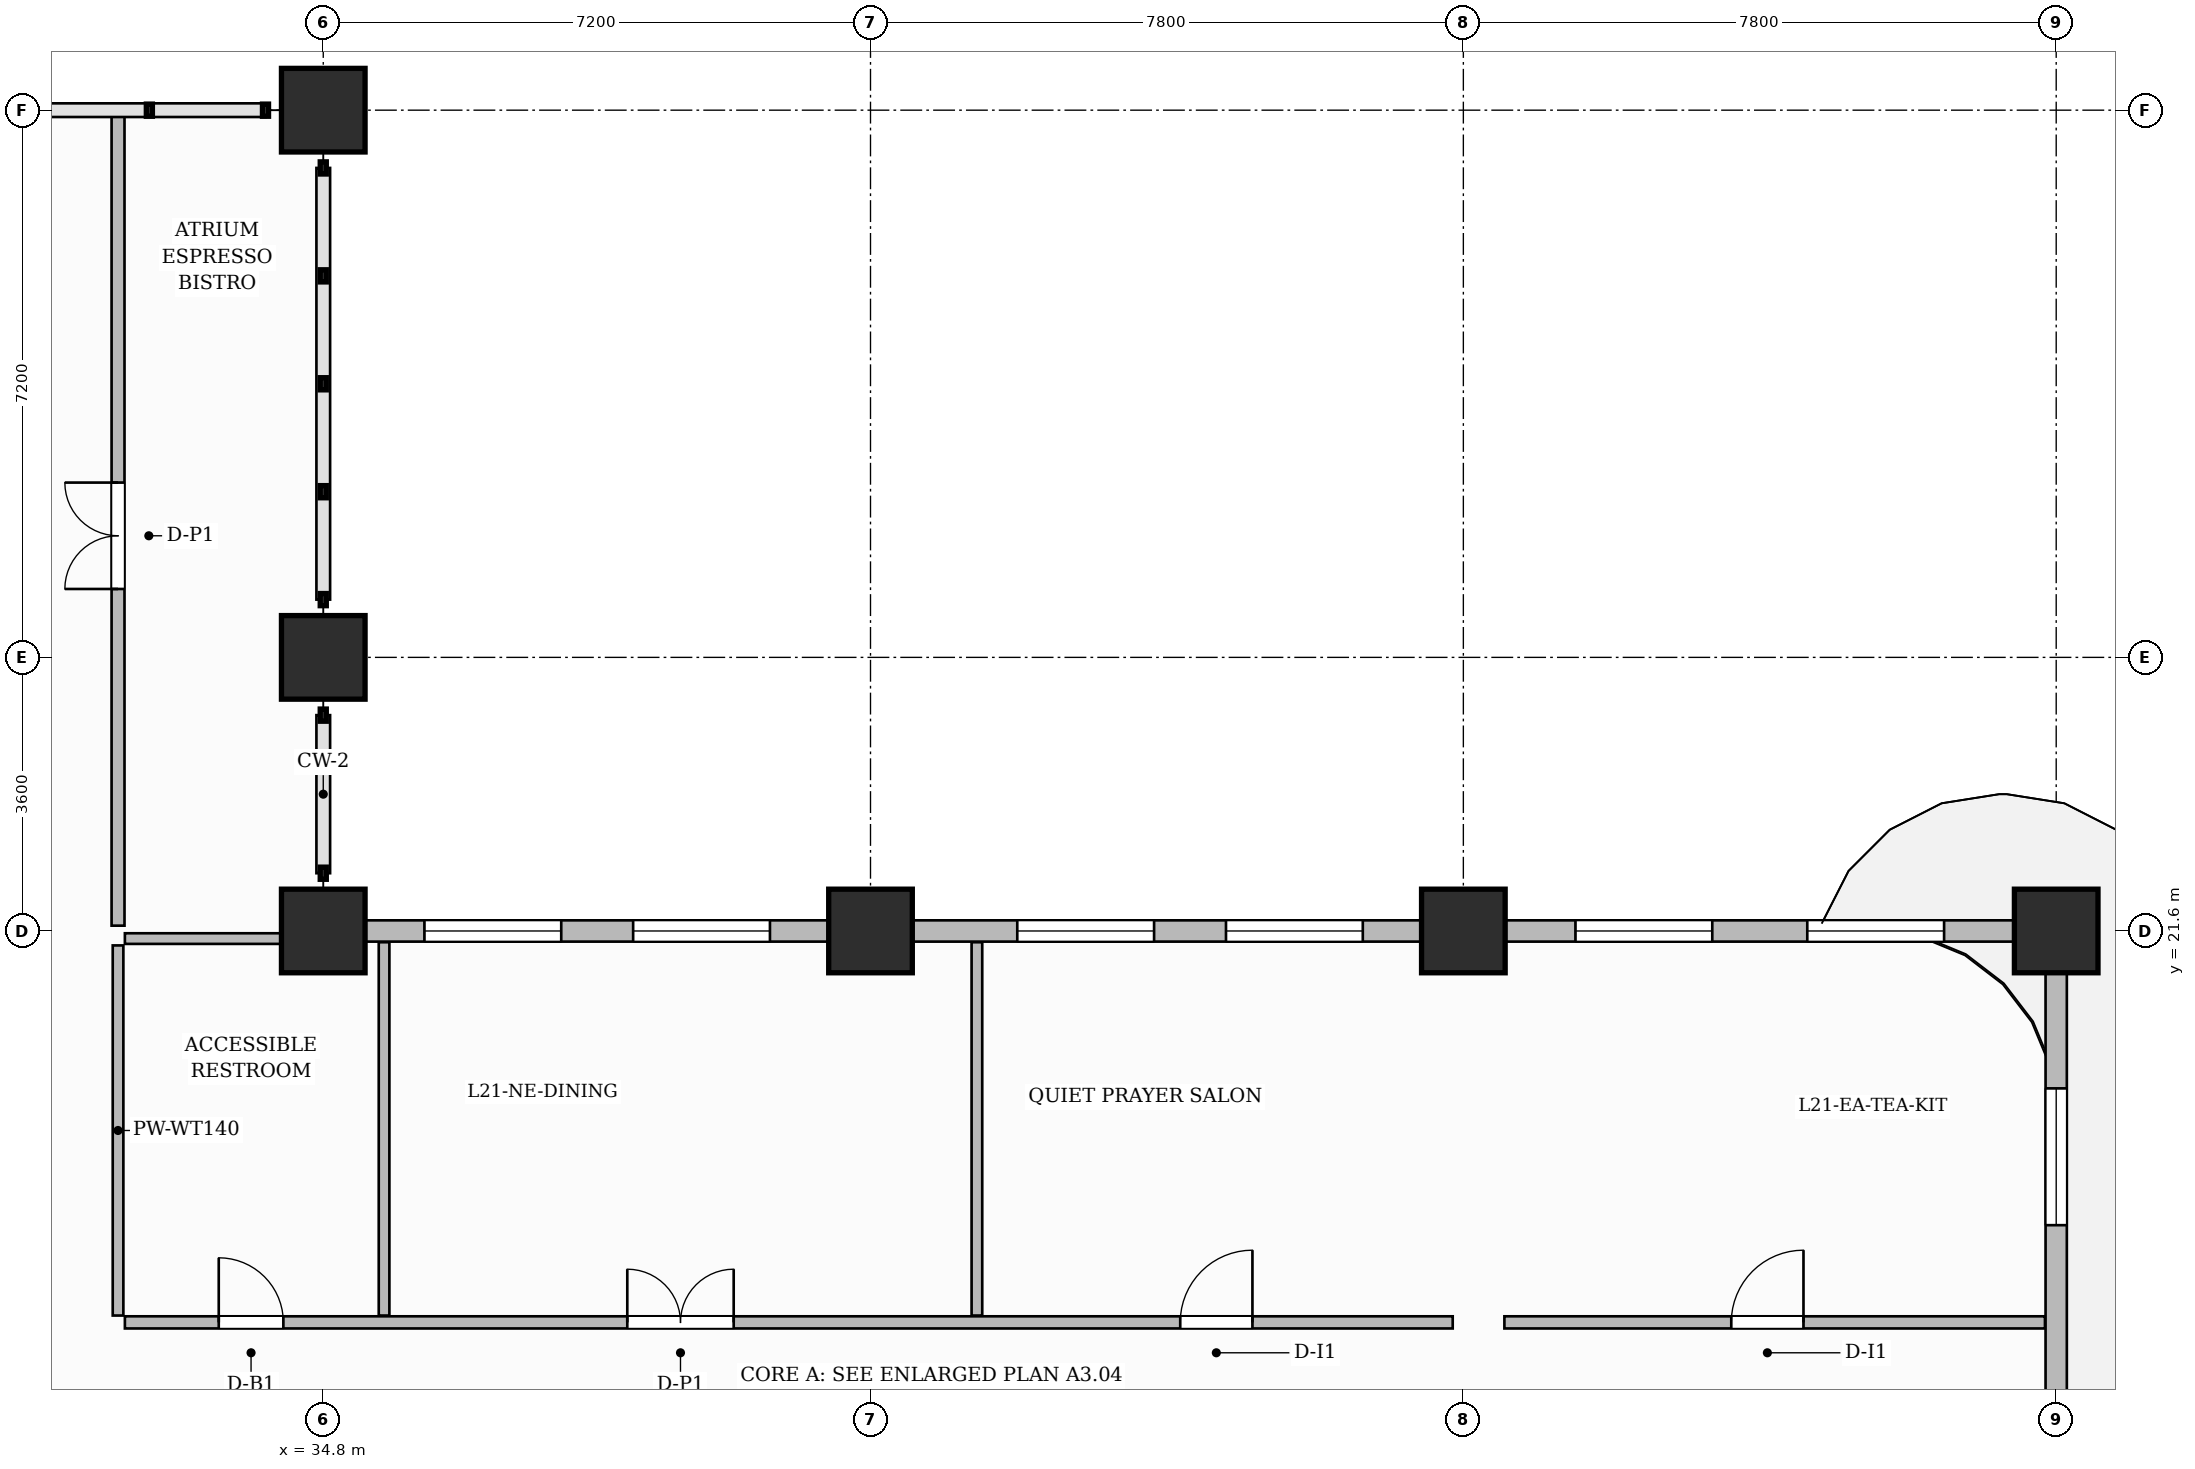
"""IFC4 building model, lengths in metres.
Left out: names, types, materials, properties, quantities, classifications, styles, units other than length and angle.
Written with IfcOpenShell. Run it as: python <this file> out.ifc"""

import sys

from ifc_helpers import new_model, si_unit, direction, frame, frame_2d, origin, origin_2d, place, context, subcontext, project, spatial, rectangle, extrude, source, transform, mapped, element, fill, save


model = new_model("IFC4")
c1 = context("Model", 3, precision=1e-05, world=origin(), true_north=direction((0.0, 1.0)))
c2 = subcontext(c1, "Body", "Model", "MODEL_VIEW")
j1 = project(units=[si_unit("LENGTHUNIT", "METRE"), si_unit("PLANEANGLEUNIT", "RADIAN")], contexts=[c1])
p1 = place(None, origin())
s1 = spatial("IfcSite", under=j1, at=p1, CompositionType="ELEMENT")
p2 = place(p1, origin())
s2 = spatial("IfcBuilding", under=s1, at=p2, CompositionType="ELEMENT")
p3 = place(p2, frame((0.0, 0.0, 87.9)))
s3 = spatial("IfcBuildingStorey", under=s2, at=p3, CompositionType="ELEMENT", Elevation=87.9)
m1 = source(origin(), c2, "Body", "SweptSolid", [
    extrude(rectangle(XDim=1.1, YDim=1.1, at=origin_2d()), origin(), (0.0, 0.0, 1.0), 3.7),
])
for number, where, z_axis, x_axis in (
    (1, (34.8, 21.6, 0.0), (0.0, 0.0, 1.0), (1.0, 0.0, 0.0)),
    (2, (34.8, 25.2, 0.0), (0.0, 0.0, 1.0), (1.0, 0.0, 0.0)),
    (3, (34.8, 32.4, 0.0), (0.0, 0.0, 1.0), (1.0, 0.0, 0.0)),
    (4, (42.0, 21.6, 0.0), (0.0, 0.0, 1.0), (1.0, 0.0, 0.0)),
    (5, (49.8, 21.6, 0.0), (0.0, 0.0, 1.0), (1.0, 0.0, 0.0)),
    (6, (57.6, 21.6, 0.0), (0.0, 0.0, 1.0), (1.0, 0.0, 0.0)),
):
    element("IfcColumn", number, at=place(p3, frame(where, z_axis=z_axis, x_axis=x_axis)), inside=s3, PredefinedType="COLUMN", context=c2, shape_type="MappedRepresentation", body=[
        mapped(m1, transform((0.0, 0.0, 0.0), scale=1.0)),
    ])
p4 = place(p3, frame((32.19, 16.45, 0.0), z_axis=(0.0, 0.0, 1.0), x_axis=(1.0, 0.0, 0.0)))
e7 = element("IfcWall", 7, at=p4, inside=s3, PredefinedType="PARTITIONING", context=c2, shape_type="SweptSolid", body=[
    extrude(rectangle(XDim=17.47, YDim=0.16, at=frame_2d((8.735, 0.0))), origin(), (0.0, 0.0, 1.0), 3.45),
])
p5 = place(p4, frame((1.235, 0.0, 0.0)))
e8 = element("IfcOpeningElement", 8, at=p5, cuts=e7, PredefinedType="OPENING", context=c2, shape_type="SweptSolid", body=[
    extrude(rectangle(XDim=0.85, YDim=2.1, at=frame_2d((0.425, 1.05))), frame((0.0, 0.09, 0.0), z_axis=(0.0, -1.0, 0.0), x_axis=(1.0, 0.0, 0.0)), (0.0, 0.0, 1.0), 0.18),
])
p6 = place(p4, frame((6.61, 0.0, 0.0)))
e9 = element("IfcOpeningElement", 9, at=p6, cuts=e7, PredefinedType="OPENING", context=c2, shape_type="SweptSolid", body=[
    extrude(rectangle(XDim=1.4, YDim=2.35, at=frame_2d((0.7, 1.175))), frame((0.0, 0.09, 0.0), z_axis=(0.0, -1.0, 0.0), x_axis=(1.0, 0.0, 0.0)), (0.0, 0.0, 1.0), 0.18),
])
p7 = place(p4, frame((13.885, 0.0, 0.0)))
e10 = element("IfcOpeningElement", 10, at=p7, cuts=e7, PredefinedType="OPENING", context=c2, shape_type="SweptSolid", body=[
    extrude(rectangle(XDim=0.95, YDim=2.15, at=frame_2d((0.475, 1.075))), frame((0.0, 0.09, 0.0), z_axis=(0.0, -1.0, 0.0), x_axis=(1.0, 0.0, 0.0)), (0.0, 0.0, 1.0), 0.18),
])
p8 = place(p3, frame((50.34, 16.45, 0.0), z_axis=(0.0, 0.0, 1.0), x_axis=(1.0, 0.0, 0.0)))
e11 = element("IfcWall", 11, at=p8, inside=s3, PredefinedType="PARTITIONING", context=c2, shape_type="SweptSolid", body=[
    extrude(rectangle(XDim=7.112, YDim=0.16, at=frame_2d((3.556, 0.0))), origin(), (0.0, 0.0, 1.0), 3.45),
])
p9 = place(p8, frame((2.985, 0.0, 0.0)))
e12 = element("IfcOpeningElement", 12, at=p9, cuts=e11, PredefinedType="OPENING", context=c2, shape_type="SweptSolid", body=[
    extrude(rectangle(XDim=0.95, YDim=2.15, at=frame_2d((0.475, 1.075))), frame((0.0, 0.09, 0.0), z_axis=(0.0, -1.0, 0.0), x_axis=(1.0, 0.0, 0.0)), (0.0, 0.0, 1.0), 0.18),
])
p10 = place(p3, frame((32.1, 16.54, 0.0), z_axis=(0.0, 0.0, 1.0), x_axis=(0.0, 1.0, 0.0)))
e13 = element("IfcWall", 13, at=p10, inside=s3, PredefinedType="PARTITIONING", context=c2, shape_type="SweptSolid", body=[
    extrude(rectangle(XDim=4.87, YDim=0.14, at=frame_2d((2.435, 0.0))), origin(), (0.0, 0.0, 1.0), 3.45),
])
for number, where, z_axis, x_axis in (
    (14, (35.6, 16.54, 0.0), (0.0, 0.0, 1.0), (0.0, 1.0, 0.0)),
    (15, (43.4, 16.54, 0.0), (0.0, 0.0, 1.0), (0.0, 1.0, 0.0)),
):
    element("IfcWall", number, at=place(p3, frame(where, z_axis=z_axis, x_axis=x_axis)), inside=s3, PredefinedType="PARTITIONING", context=c2, shape_type="SweptSolid", body=[
        extrude(rectangle(XDim=4.912, YDim=0.14, at=frame_2d((2.456, 0.0))), origin(), (0.0, 0.0, 1.0), 3.45),
    ])
p11 = place(p3, frame((32.19, 21.5, 0.0), z_axis=(0.0, 0.0, 1.0), x_axis=(1.0, 0.0, 0.0)))
e16 = element("IfcWall", 16, at=p11, inside=s3, PredefinedType="PARTITIONING", context=c2, shape_type="SweptSolid", body=[
    extrude(rectangle(XDim=2.42, YDim=0.14, at=frame_2d((1.21, 0.0))), origin(), (0.0, 0.0, 1.0), 2.885),
])
p12 = place(p3, frame((32.1, 21.67, 0.0), z_axis=(0.0, 0.0, 1.0), x_axis=(0.0, 1.0, 0.0)))
e17 = element("IfcWall", 17, at=p12, inside=s3, PredefinedType="PARTITIONING", context=c2, shape_type="SweptSolid", body=[
    extrude(rectangle(XDim=10.702, YDim=0.17, at=frame_2d((5.351, 0.0))), origin(), (0.0, 0.0, 1.0), 3.45),
])
p13 = place(p12, frame((4.43, 0.0, 0.0)))
e18 = element("IfcOpeningElement", 18, at=p13, cuts=e17, PredefinedType="OPENING", context=c2, shape_type="SweptSolid", body=[
    extrude(rectangle(XDim=1.4, YDim=2.35, at=frame_2d((0.7, 1.175))), frame((0.0, 0.095, 0.0), z_axis=(0.0, -1.0, 0.0), x_axis=(1.0, 0.0, 0.0)), (0.0, 0.0, 1.0), 0.19),
])
p14 = place(p3, frame((57.6, 0.05, 0.0), z_axis=(0.0, 0.0, 1.0), x_axis=(0.0, 1.0, 0.0)))
e19 = element("IfcWall", 19, at=p14, inside=s3, PredefinedType="SOLIDWALL", context=c2, shape_type="SweptSolid", body=[
    extrude(rectangle(XDim=21.5, YDim=0.28, at=frame_2d((10.75, 0.0))), origin(), (0.0, 0.0, 1.0), 2.885),
])
p15 = place(p14, frame((2.75, 0.0, 0.0)))
e20 = element("IfcOpeningElement", 20, at=p15, cuts=e19, PredefinedType="OPENING", context=c2, shape_type="SweptSolid", body=[
    extrude(rectangle(XDim=1.2, YDim=2.2, at=frame_2d((0.6, 1.1))), frame((0.0, 0.15, 0.0), z_axis=(0.0, -1.0, 0.0), x_axis=(1.0, 0.0, 0.0)), (0.0, 0.0, 1.0), 0.3),
])
p16 = place(p14, frame((1.025, 0.0, 0.8)))
e21 = element("IfcOpeningElement", 21, at=p16, cuts=e19, PredefinedType="OPENING", context=c2, shape_type="SweptSolid", body=[
    extrude(rectangle(XDim=1.15, YDim=1.8, at=frame_2d((0.575, 0.9))), frame((0.0, 0.15, 0.0), z_axis=(0.0, -1.0, 0.0), x_axis=(1.0, 0.0, 0.0)), (0.0, 0.0, 1.0), 0.3),
])
p17 = place(p14, frame((4.6, 0.0, 0.8)))
e22 = element("IfcOpeningElement", 22, at=p17, cuts=e19, PredefinedType="OPENING", context=c2, shape_type="SweptSolid", body=[
    extrude(rectangle(XDim=1.4, YDim=1.85, at=frame_2d((0.7, 0.925))), frame((0.0, 0.15, 0.0), z_axis=(0.0, -1.0, 0.0), x_axis=(1.0, 0.0, 0.0)), (0.0, 0.0, 1.0), 0.3),
])
p18 = place(p14, frame((8.475, 0.0, 0.8)))
e23 = element("IfcOpeningElement", 23, at=p18, cuts=e19, PredefinedType="OPENING", context=c2, shape_type="SweptSolid", body=[
    extrude(rectangle(XDim=1.8, YDim=1.85, at=frame_2d((0.9, 0.925))), frame((0.0, 0.15, 0.0), z_axis=(0.0, -1.0, 0.0), x_axis=(1.0, 0.0, 0.0)), (0.0, 0.0, 1.0), 0.3),
])
p19 = place(p14, frame((11.225, 0.0, 0.8)))
e24 = element("IfcOpeningElement", 24, at=p19, cuts=e19, PredefinedType="OPENING", context=c2, shape_type="SweptSolid", body=[
    extrude(rectangle(XDim=1.8, YDim=1.85, at=frame_2d((0.9, 0.925))), frame((0.0, 0.15, 0.0), z_axis=(0.0, -1.0, 0.0), x_axis=(1.0, 0.0, 0.0)), (0.0, 0.0, 1.0), 0.3),
])
p20 = place(p14, frame((17.679, 0.0, 0.8)))
e25 = element("IfcOpeningElement", 25, at=p20, cuts=e19, PredefinedType="OPENING", context=c2, shape_type="SweptSolid", body=[
    extrude(rectangle(XDim=1.8, YDim=1.85, at=frame_2d((0.9, 0.925))), frame((0.0, 0.15, 0.0), z_axis=(0.0, -1.0, 0.0), x_axis=(1.0, 0.0, 0.0)), (0.0, 0.0, 1.0), 0.3),
])
p21 = place(p3, frame((34.8, 21.6, 0.0), z_axis=(0.0, 0.0, 1.0), x_axis=(1.0, 0.0, 0.0)))
e26 = element("IfcWall", 26, at=p21, inside=s3, PredefinedType="SOLIDWALL", context=c2, shape_type="SweptSolid", body=[
    extrude(rectangle(XDim=22.8, YDim=0.28, at=frame_2d((11.4, 0.0))), origin(), (0.0, 0.0, 1.0), 2.885),
])
p22 = place(p21, frame((1.331, 0.0, 0.8)))
e27 = element("IfcOpeningElement", 27, at=p22, cuts=e26, PredefinedType="OPENING", context=c2, shape_type="SweptSolid", body=[
    extrude(rectangle(XDim=1.8, YDim=1.85, at=frame_2d((0.9, 0.925))), frame((0.0, 0.15, 0.0), z_axis=(0.0, -1.0, 0.0), x_axis=(1.0, 0.0, 0.0)), (0.0, 0.0, 1.0), 0.3),
])
p23 = place(p21, frame((4.077, 0.0, 0.8)))
e28 = element("IfcOpeningElement", 28, at=p23, cuts=e26, PredefinedType="OPENING", context=c2, shape_type="SweptSolid", body=[
    extrude(rectangle(XDim=1.8, YDim=1.85, at=frame_2d((0.9, 0.925))), frame((0.0, 0.15, 0.0), z_axis=(0.0, -1.0, 0.0), x_axis=(1.0, 0.0, 0.0)), (0.0, 0.0, 1.0), 0.3),
])
p24 = place(p21, frame((9.131, 0.0, 0.8)))
e29 = element("IfcOpeningElement", 29, at=p24, cuts=e26, PredefinedType="OPENING", context=c2, shape_type="SweptSolid", body=[
    extrude(rectangle(XDim=1.8, YDim=1.85, at=frame_2d((0.9, 0.925))), frame((0.0, 0.15, 0.0), z_axis=(0.0, -1.0, 0.0), x_axis=(1.0, 0.0, 0.0)), (0.0, 0.0, 1.0), 0.3),
])
p25 = place(p21, frame((11.877, 0.0, 0.8)))
e30 = element("IfcOpeningElement", 30, at=p25, cuts=e26, PredefinedType="OPENING", context=c2, shape_type="SweptSolid", body=[
    extrude(rectangle(XDim=1.8, YDim=1.85, at=frame_2d((0.9, 0.925))), frame((0.0, 0.15, 0.0), z_axis=(0.0, -1.0, 0.0), x_axis=(1.0, 0.0, 0.0)), (0.0, 0.0, 1.0), 0.3),
])
p26 = place(p21, frame((16.475, 0.0, 0.8)))
e31 = element("IfcOpeningElement", 31, at=p26, cuts=e26, PredefinedType="OPENING", context=c2, shape_type="SweptSolid", body=[
    extrude(rectangle(XDim=1.8, YDim=1.85, at=frame_2d((0.9, 0.925))), frame((0.0, 0.15, 0.0), z_axis=(0.0, -1.0, 0.0), x_axis=(1.0, 0.0, 0.0)), (0.0, 0.0, 1.0), 0.3),
])
p27 = place(p21, frame((19.525, 0.0, 0.8)))
e32 = element("IfcOpeningElement", 32, at=p27, cuts=e26, PredefinedType="OPENING", context=c2, shape_type="SweptSolid", body=[
    extrude(rectangle(XDim=1.8, YDim=1.85, at=frame_2d((0.9, 0.925))), frame((0.0, 0.15, 0.0), z_axis=(0.0, -1.0, 0.0), x_axis=(1.0, 0.0, 0.0)), (0.0, 0.0, 1.0), 0.3),
])
m2 = source(origin(), c2, "Body", "SweptSolid", [
    extrude(rectangle(XDim=0.95, YDim=2.15, at=frame_2d((0.475, 1.075))), frame((0.0, 0.025, 0.0), z_axis=(0.0, -1.0, 0.0), x_axis=(1.0, 0.0, 0.0)), (0.0, 0.0, 1.0), 0.05),
])
p28 = place(p9, origin())
e33 = element("IfcDoor", 33, at=p28, inside=s3, OperationType="SINGLE_SWING_RIGHT", PredefinedType="DOOR", context=c2, shape_type="MappedRepresentation", body=[
    mapped(m2, transform((0.0, 0.0, 0.0), scale=1.0)),
])
fill(e12, e33)
m3 = source(origin(), c2, "Body", "SweptSolid", [
    extrude(rectangle(XDim=0.85, YDim=2.1, at=frame_2d((0.425, 1.05))), frame((0.0, 0.025, 0.0), z_axis=(0.0, -1.0, 0.0), x_axis=(1.0, 0.0, 0.0)), (0.0, 0.0, 1.0), 0.05),
])
p29 = place(p5, origin())
e34 = element("IfcDoor", 34, at=p29, inside=s3, OperationType="SINGLE_SWING_LEFT", PredefinedType="DOOR", context=c2, shape_type="MappedRepresentation", body=[
    mapped(m3, transform((0.0, 0.0, 0.0), scale=1.0)),
])
fill(e8, e34)
m4 = source(origin(), c2, "Body", "SweptSolid", [
    extrude(rectangle(XDim=1.4, YDim=2.35, at=frame_2d((0.7, 1.175))), frame((0.0, 0.025, 0.0), z_axis=(0.0, -1.0, 0.0), x_axis=(1.0, 0.0, 0.0)), (0.0, 0.0, 1.0), 0.05),
])
p30 = place(p6, origin())
e35 = element("IfcDoor", 35, at=p30, inside=s3, OperationType="DOUBLE_DOOR_SINGLE_SWING", PredefinedType="DOOR", context=c2, shape_type="MappedRepresentation", body=[
    mapped(m4, transform((0.0, 0.0, 0.0), scale=1.0)),
])
fill(e9, e35)
p31 = place(p7, origin())
e36 = element("IfcDoor", 36, at=p31, inside=s3, OperationType="SINGLE_SWING_RIGHT", PredefinedType="DOOR", context=c2, shape_type="MappedRepresentation", body=[
    mapped(m2, transform((0.0, 0.0, 0.0), scale=1.0)),
])
fill(e10, e36)
p32 = place(p13, origin())
e37 = element("IfcDoor", 37, at=p32, inside=s3, OperationType="DOUBLE_DOOR_SINGLE_SWING", PredefinedType="DOOR", context=c2, shape_type="MappedRepresentation", body=[
    mapped(m4, transform((0.0, 0.0, 0.0), scale=1.0)),
])
fill(e18, e37)
m5 = source(origin(), c2, "Body", "SweptSolid", [
    extrude(rectangle(XDim=1.8, YDim=1.85, at=frame_2d((0.9, 0.925))), frame((0.0, 0.03, 0.0), z_axis=(0.0, -1.0, 0.0), x_axis=(1.0, 0.0, 0.0)), (0.0, 0.0, 1.0), 0.06),
])
p33 = place(p20, origin())
e38 = element("IfcWindow", 38, at=p33, inside=s3, PartitioningType="DOUBLE_PANEL_VERTICAL", PredefinedType="WINDOW", context=c2, shape_type="MappedRepresentation", body=[
    mapped(m5, transform((0.0, 0.0, 0.0), scale=1.0)),
])
fill(e25, e38)
p34 = place(p22, origin())
e39 = element("IfcWindow", 39, at=p34, inside=s3, PartitioningType="DOUBLE_PANEL_VERTICAL", PredefinedType="WINDOW", context=c2, shape_type="MappedRepresentation", body=[
    mapped(m5, transform((0.0, 0.0, 0.0), scale=1.0)),
])
fill(e27, e39)
p35 = place(p23, origin())
e40 = element("IfcWindow", 40, at=p35, inside=s3, PartitioningType="DOUBLE_PANEL_VERTICAL", PredefinedType="WINDOW", context=c2, shape_type="MappedRepresentation", body=[
    mapped(m5, transform((0.0, 0.0, 0.0), scale=1.0)),
])
fill(e28, e40)
p36 = place(p24, origin())
e41 = element("IfcWindow", 41, at=p36, inside=s3, PartitioningType="DOUBLE_PANEL_VERTICAL", PredefinedType="WINDOW", context=c2, shape_type="MappedRepresentation", body=[
    mapped(m5, transform((0.0, 0.0, 0.0), scale=1.0)),
])
fill(e29, e41)
p37 = place(p25, origin())
e42 = element("IfcWindow", 42, at=p37, inside=s3, PartitioningType="DOUBLE_PANEL_VERTICAL", PredefinedType="WINDOW", context=c2, shape_type="MappedRepresentation", body=[
    mapped(m5, transform((0.0, 0.0, 0.0), scale=1.0)),
])
fill(e30, e42)
p38 = place(p26, origin())
e43 = element("IfcWindow", 43, at=p38, inside=s3, PartitioningType="DOUBLE_PANEL_VERTICAL", PredefinedType="WINDOW", context=c2, shape_type="MappedRepresentation", body=[
    mapped(m5, transform((0.0, 0.0, 0.0), scale=1.0)),
])
fill(e31, e43)
p39 = place(p27, origin())
e44 = element("IfcWindow", 44, at=p39, inside=s3, PartitioningType="DOUBLE_PANEL_VERTICAL", PredefinedType="WINDOW", context=c2, shape_type="MappedRepresentation", body=[
    mapped(m5, transform((0.0, 0.0, 0.0), scale=1.0)),
])
fill(e32, e44)
save(model, sys.argv[1])
